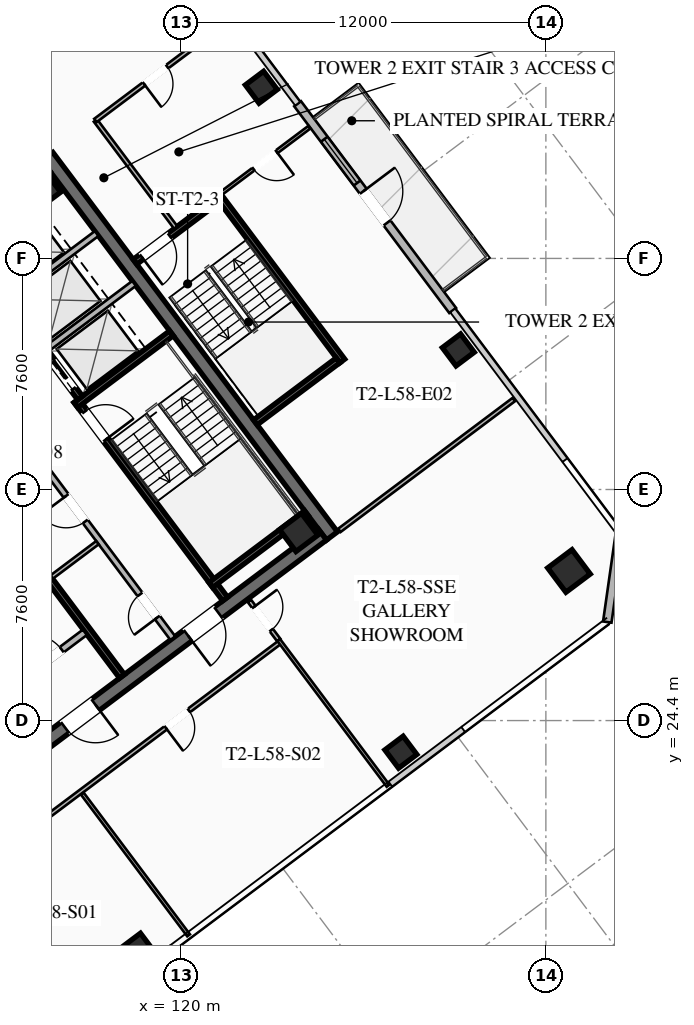
"""IFC4 building model, lengths in metres.
Left out: names, types, materials, properties, quantities, classifications, styles, units other than length and angle.
Written with IfcOpenShell. Run it as: python <this file> out.ifc"""

import sys

from ifc_helpers import new_model, si_unit, direction, frame, frame_2d, origin, origin_2d, place, context, subcontext, project, spatial, rectangle, hollow_rectangle, extrude, element, fill, save


model = new_model("IFC4")
c1 = context("Model", 3, precision=1e-05, world=origin(), true_north=direction((0.0, 1.0)))
c2 = subcontext(c1, "Body", "Model", "MODEL_VIEW")
j1 = project(units=[si_unit("LENGTHUNIT", "METRE"), si_unit("PLANEANGLEUNIT", "RADIAN")], contexts=[c1])
p1 = place(None, origin())
s1 = spatial("IfcSite", under=j1, at=p1, CompositionType="ELEMENT")
p2 = place(p1, origin())
s2 = spatial("IfcBuilding", under=s1, at=p2, CompositionType="ELEMENT")
p3 = place(p2, frame((0.0, 0.0, 214.85)))
s3 = spatial("IfcBuildingStorey", under=s2, at=p3, CompositionType="ELEMENT", Elevation=214.85)
p4 = place(p3, frame((115.604, 42.953, 0.0), z_axis=(0.0, 0.0, 1.0), x_axis=(0.600005007985, -0.799996243986, 0.0)))
e1 = element("IfcWall", 1, at=p4, inside=s3, PredefinedType="SHEAR", context=c2, shape_type="SweptSolid", body=[
    extrude(rectangle(XDim=15.6, YDim=0.45, at=frame_2d((7.8, 0.0))), origin(), (0.0, 0.0, 1.0), 3.55),
])
p5 = place(p3, frame((124.649, 30.518, 0.0), z_axis=(0.0, 0.0, 1.0), x_axis=(-0.8, -0.6, 0.0)))
e2 = element("IfcWall", 2, at=p5, inside=s3, PredefinedType="SHEAR", context=c2, shape_type="SweptSolid", body=[
    extrude(rectangle(XDim=15.26, YDim=0.45, at=frame_2d((7.63, 0.0))), origin(), (0.0, 0.0, 1.0), 3.55),
])
p6 = place(p5, frame((9.33, 0.0, 0.0)))
e3 = element("IfcOpeningElement", 3, at=p6, cuts=e2, PredefinedType="OPENING", context=c2, shape_type="SweptSolid", body=[
    extrude(rectangle(XDim=1.25, YDim=2.25, at=frame_2d((0.625, 1.125))), frame((0.0, 0.235, 0.0), z_axis=(0.0, -1.0, 0.0), x_axis=(1.0, 0.0, 0.0)), (0.0, 0.0, 1.0), 0.47),
])
p7 = place(p5, frame((4.28, 0.0, 0.0)))
e4 = element("IfcOpeningElement", 4, at=p7, cuts=e2, PredefinedType="OPENING", context=c2, shape_type="SweptSolid", body=[
    extrude(rectangle(XDim=1.25, YDim=2.25, at=frame_2d((0.625, 1.125))), frame((0.0, 0.235, 0.0), z_axis=(0.0, -1.0, 0.0), x_axis=(1.0, 0.0, 0.0)), (0.0, 0.0, 1.0), 0.47),
])
for number, where, z_axis, x_axis in (
    (5, (123.87, 30.59, 0.0), (0.0, 0.0, 1.0), (0.8, 0.6, 0.0)),
    (6, (115.41, 41.87, 0.0), (0.0, 0.0, 1.0), (0.8, 0.6, 0.0)),
):
    element("IfcColumn", number, at=place(p3, frame(where, z_axis=z_axis, x_axis=x_axis)), inside=s3, PredefinedType="COLUMN", context=c2, shape_type="SweptSolid", body=[
        extrude(hollow_rectangle(XDim=0.9, YDim=0.9, WallThickness=0.04, at=origin_2d()), origin(), (0.0, 0.0, 1.0), 3.37),
    ])
p8 = place(p3, frame((132.76, 29.32, 0.0), z_axis=(0.0, 0.0, 1.0), x_axis=(0.799999996291, 0.600000004945, 0.0)))
e7 = element("IfcColumn", 7, at=p8, inside=s3, PredefinedType="COLUMN", context=c2, shape_type="SweptSolid", body=[
    extrude(hollow_rectangle(XDim=1.0, YDim=1.0, WallThickness=0.04, at=origin_2d()), origin(), (0.0, 0.0, 1.0), 3.37),
])
for number, where, z_axis, x_axis in (
    (8, (118.59, 16.88, 0.0), (0.0, 0.0, 1.0), (0.8, 0.6, 0.0)),
    (9, (127.23, 23.36, 0.0), (0.0, 0.0, 1.0), (0.8, 0.6, 0.0)),
    (10, (129.12, 36.59, 0.0), (0.0, 0.0, 1.0), (0.8, 0.6, 0.0)),
    (11, (122.64, 45.23, 0.0), (0.0, 0.0, 1.0), (0.8, 0.6, 0.0)),
):
    element("IfcColumn", number, at=place(p3, frame(where, z_axis=z_axis, x_axis=x_axis)), inside=s3, PredefinedType="COLUMN", context=c2, shape_type="SweptSolid", body=[
        extrude(hollow_rectangle(XDim=0.75, YDim=0.75, WallThickness=0.032, at=origin_2d()), origin(), (0.0, 0.0, 1.0), 3.37),
    ])
p9 = place(p3, frame((123.834, 44.688, 0.0), z_axis=(0.0, 0.0, 1.0), x_axis=(0.600004595526, -0.799996553335, 0.0)))
e12 = element("IfcWall", 12, at=p9, inside=s3, PredefinedType="SOLIDWALL", context=c2, shape_type="SweptSolid", body=[
    extrude(rectangle(XDim=8.5, YDim=0.28, at=frame_2d((4.25, 0.0))), origin(), (0.0, 0.0, 1.0), 3.37),
])
p10 = place(p9, frame((3.6, 0.0, 0.0)))
e13 = element("IfcOpeningElement", 13, at=p10, cuts=e12, PredefinedType="OPENING", context=c2, shape_type="SweptSolid", body=[
    extrude(rectangle(XDim=1.3, YDim=2.15, at=frame_2d((0.65, 1.075))), frame((0.0, 0.15, 0.0), z_axis=(0.0, -1.0, 0.0), x_axis=(1.0, 0.0, 0.0)), (0.0, 0.0, 1.0), 0.3),
])
p11 = place(p9, frame((1.46, 0.0, 0.85)))
e14 = element("IfcOpeningElement", 14, at=p11, cuts=e12, PredefinedType="OPENING", context=c2, shape_type="SweptSolid", body=[
    extrude(rectangle(XDim=1.8, YDim=1.92, at=frame_2d((0.9, 0.96))), frame((0.0, 0.15, 0.0), z_axis=(0.0, -1.0, 0.0), x_axis=(1.0, 0.0, 0.0)), (0.0, 0.0, 1.0), 0.3),
])
p12 = place(p3, frame((134.44, 30.58, 0.0), z_axis=(0.0, 0.0, 1.0), x_axis=(-0.14138683146, -0.989954425158, 0.0)))
e15 = element("IfcWall", 15, at=p12, inside=s3, PredefinedType="SOLIDWALL", context=c2, shape_type="SweptSolid", body=[
    extrude(rectangle(XDim=2.97, YDim=0.28, at=frame_2d((1.485, 0.0))), origin(), (0.0, 0.0, 1.0), 3.37),
])
p13 = place(p3, frame((116.56, 34.92, 0.0), z_axis=(0.0, 0.0, 1.0), x_axis=(0.59999041401, -0.800007189403, 0.0)))
e16 = element("IfcWall", 16, at=p13, inside=s3, PredefinedType="SHEAR", context=c2, shape_type="SweptSolid", body=[
    extrude(rectangle(XDim=8.15, YDim=0.2, at=frame_2d((4.075, 0.0))), origin(), (0.0, 0.0, 1.0), 3.37),
])
p14 = place(p13, frame((0.45, 0.0, 0.0)))
e17 = element("IfcOpeningElement", 17, at=p14, cuts=e16, PredefinedType="OPENING", context=c2, shape_type="SweptSolid", body=[
    extrude(rectangle(XDim=1.15, YDim=2.2, at=frame_2d((0.575, 1.1))), frame((0.0, 0.11, 0.0), z_axis=(0.0, -1.0, 0.0), x_axis=(1.0, 0.0, 0.0)), (0.0, 0.0, 1.0), 0.22),
])
for number, where, z_axis, x_axis in (
    (18, (116.54, 34.78, 0.0), (0.0, 0.0, 1.0), (0.8, 0.6, 0.0)),
    (19, (120.98, 28.86, 0.0), (0.0, 0.0, 1.0), (0.8, 0.6, 0.0)),
):
    element("IfcWall", number, at=place(p3, frame(where, z_axis=z_axis, x_axis=x_axis)), inside=s3, PredefinedType="SHEAR", context=c2, shape_type="SweptSolid", body=[
        extrude(rectangle(XDim=3.93, YDim=0.2, at=frame_2d((1.965, 0.0))), origin(), (0.0, 0.0, 1.0), 3.37),
    ])
p15 = place(p3, frame((118.058, 25.856, 0.0), z_axis=(0.0, 0.0, 1.0), x_axis=(-0.600002657301, 0.799998007018, 0.0)))
e20 = element("IfcWall", 20, at=p15, inside=s3, PredefinedType="SHEAR", context=c2, shape_type="SweptSolid", body=[
    extrude(rectangle(XDim=14.7, YDim=0.2, at=frame_2d((7.35, 0.0))), origin(), (0.0, 0.0, 1.0), 3.37),
])
p16 = place(p3, frame((114.316, 25.412, 0.0), z_axis=(0.0, 0.0, 1.0), x_axis=(0.800018601094, 0.59997519774, 0.0)))
e21 = element("IfcWall", 21, at=p16, inside=s3, PredefinedType="SOLIDWALL", context=c2, shape_type="SweptSolid", body=[
    extrude(rectangle(XDim=3.15, YDim=0.22, at=frame_2d((1.575, 0.0))), origin(), (0.0, 0.0, 1.0), 2.723),
])
p17 = place(p16, frame((0.95, 0.0, 0.0)))
e22 = element("IfcOpeningElement", 22, at=p17, cuts=e21, PredefinedType="OPENING", context=c2, shape_type="SweptSolid", body=[
    extrude(rectangle(XDim=1.25, YDim=2.25, at=frame_2d((0.625, 1.125))), frame((0.0, 0.12, 0.0), z_axis=(0.0, -1.0, 0.0), x_axis=(1.0, 0.0, 0.0)), (0.0, 0.0, 1.0), 0.24),
])
p18 = place(p3, frame((112.75, 40.25, 0.0), z_axis=(0.0, 0.0, 1.0), x_axis=(0.599994036198, -0.800004472816, 0.0)))
e23 = element("IfcWall", 23, at=p18, inside=s3, PredefinedType="SHEAR", context=c2, shape_type="SweptSolid", body=[
    extrude(rectangle(XDim=6.55, YDim=0.2, at=frame_2d((3.275, 0.0))), origin(), (0.0, 0.0, 1.0), 3.37),
])
p19 = place(p18, frame((5.075, 0.0, 0.0)))
e24 = element("IfcOpeningElement", 24, at=p19, cuts=e23, PredefinedType="OPENING", context=c2, shape_type="SweptSolid", body=[
    extrude(rectangle(XDim=1.1, YDim=2.2, at=frame_2d((0.55, 1.1))), frame((0.0, 0.11, 0.0), z_axis=(0.0, -1.0, 0.0), x_axis=(1.0, 0.0, 0.0)), (0.0, 0.0, 1.0), 0.22),
])
p20 = place(p18, frame((3.025, 0.0, 0.0)))
e25 = element("IfcOpeningElement", 25, at=p20, cuts=e23, PredefinedType="OPENING", context=c2, shape_type="SweptSolid", body=[
    extrude(rectangle(XDim=1.1, YDim=2.2, at=frame_2d((0.55, 1.1))), frame((0.0, 0.11, 0.0), z_axis=(0.0, -1.0, 0.0), x_axis=(1.0, 0.0, 0.0)), (0.0, 0.0, 1.0), 0.22),
])
p21 = place(p18, frame((1.025, 0.0, 0.0)))
e26 = element("IfcOpeningElement", 26, at=p21, cuts=e23, PredefinedType="OPENING", context=c2, shape_type="SweptSolid", body=[
    extrude(rectangle(XDim=1.1, YDim=2.2, at=frame_2d((0.55, 1.1))), frame((0.0, 0.11, 0.0), z_axis=(0.0, -1.0, 0.0), x_axis=(1.0, 0.0, 0.0)), (0.0, 0.0, 1.0), 0.22),
])
for number, where, z_axis, x_axis in (
    (27, (115.59, 36.63, 0.0), (0.0, 0.0, 1.0), (0.8, 0.6, 0.0)),
    (28, (114.36, 38.27, 0.0), (0.0, 0.0, 1.0), (0.8, 0.6, 0.0)),
):
    element("IfcWall", number, at=place(p3, frame(where, z_axis=z_axis, x_axis=x_axis)), inside=s3, PredefinedType="SOLIDWALL", context=c2, shape_type="SweptSolid", body=[
        extrude(rectangle(XDim=3.58, YDim=0.2, at=frame_2d((1.79, 0.0))), origin(), (0.0, 0.0, 1.0), 3.37),
    ])
p22 = place(p3, frame((119.73, 27.11, 0.0), z_axis=(0.0, 0.0, 1.0), x_axis=(-0.600005580459, 0.799995814625, 0.0)))
e29 = element("IfcWall", 29, at=p22, inside=s3, PredefinedType="SOLIDWALL", context=c2, shape_type="SweptSolid", body=[
    extrude(rectangle(XDim=7.0, YDim=0.2, at=frame_2d((3.5, 0.0))), origin(), (0.0, 0.0, 1.0), 2.723),
])
p23 = place(p22, frame((0.85, 0.0, 0.0)))
e30 = element("IfcOpeningElement", 30, at=p23, cuts=e29, PredefinedType="OPENING", context=c2, shape_type="SweptSolid", body=[
    extrude(rectangle(XDim=0.95, YDim=2.05, at=frame_2d((0.475, 1.025))), frame((0.0, 0.11, 0.0), z_axis=(0.0, -1.0, 0.0), x_axis=(1.0, 0.0, 0.0)), (0.0, 0.0, 1.0), 0.22),
])
p24 = place(p22, frame((4.8, 0.0, 0.0)))
e31 = element("IfcOpeningElement", 31, at=p24, cuts=e29, PredefinedType="OPENING", context=c2, shape_type="SweptSolid", body=[
    extrude(rectangle(XDim=1.05, YDim=2.2, at=frame_2d((0.525, 1.1))), frame((0.0, 0.11, 0.0), z_axis=(0.0, -1.0, 0.0), x_axis=(1.0, 0.0, 0.0)), (0.0, 0.0, 1.0), 0.22),
])
p25 = place(p3, frame((115.746, 29.122, 0.0), z_axis=(0.0, 0.0, 1.0), x_axis=(0.8, 0.6, 0.0)))
e32 = element("IfcWall", 32, at=p25, inside=s3, PredefinedType="PARTITIONING", context=c2, shape_type="SweptSolid", body=[
    extrude(rectangle(XDim=1.88, YDim=0.135, at=frame_2d((0.94, 0.0))), origin(), (0.0, 0.0, 1.0), 2.723),
])
p26 = place(p3, frame((125.304, 36.228, 0.0), z_axis=(0.0, 0.0, 1.0), x_axis=(-0.59998851072, 0.800008616831, 0.0)))
e33 = element("IfcWall", 33, at=p26, inside=s3, PredefinedType="SHEAR", context=c2, shape_type="SweptSolid", body=[
    extrude(rectangle(XDim=6.8, YDim=0.2, at=frame_2d((3.4, 0.0))), origin(), (0.0, 0.0, 1.0), 3.37),
])
p27 = place(p3, frame((121.204, 41.528, 0.0), z_axis=(0.0, 0.0, 1.0), x_axis=(-0.800017232136, -0.599977023131, 0.0)))
e34 = element("IfcWall", 34, at=p27, inside=s3, PredefinedType="SHEAR", context=c2, shape_type="SweptSolid", body=[
    extrude(rectangle(XDim=3.4, YDim=0.2, at=frame_2d((1.7, 0.0))), origin(), (0.0, 0.0, 1.0), 3.37),
])
p28 = place(p27, frame((1.975, 0.0, 0.0)))
e35 = element("IfcOpeningElement", 35, at=p28, cuts=e34, PredefinedType="OPENING", context=c2, shape_type="SweptSolid", body=[
    extrude(rectangle(XDim=1.15, YDim=2.2, at=frame_2d((0.575, 1.1))), frame((0.0, 0.11, 0.0), z_axis=(0.0, -1.0, 0.0), x_axis=(1.0, 0.0, 0.0)), (0.0, 0.0, 1.0), 0.22),
])
p29 = place(p3, frame((122.444, 34.208, 0.0), z_axis=(0.0, 0.0, 1.0), x_axis=(0.79999138319, 0.600011488909, 0.0)))
e36 = element("IfcWall", 36, at=p29, inside=s3, PredefinedType="SHEAR", context=c2, shape_type="SweptSolid", body=[
    extrude(rectangle(XDim=3.4, YDim=0.2, at=frame_2d((1.7, 0.0))), origin(), (0.0, 0.0, 1.0), 3.37),
])
p30 = place(p3, frame((119.824, 40.618, 0.0), z_axis=(0.0, 0.0, 1.0), x_axis=(-0.599982243973, 0.800013316712, 0.0)))
e37 = element("IfcWall", 37, at=p30, inside=s3, PredefinedType="PARTITIONING", context=c2, shape_type="SweptSolid", body=[
    extrude(rectangle(XDim=4.4, YDim=0.135, at=frame_2d((2.2, 0.0))), origin(), (0.0, 0.0, 1.0), 2.723),
])
p31 = place(p3, frame((98.666, 34.062, 0.0), z_axis=(0.0, 0.0, 1.0), x_axis=(0.800003619866, 0.599995173482, 0.0)))
e38 = element("IfcWall", 38, at=p31, inside=s3, PredefinedType="PARTITIONING", context=c2, shape_type="SweptSolid", body=[
    extrude(rectangle(XDim=24.28, YDim=0.135, at=frame_2d((12.14, 0.0))), origin(), (0.0, 0.0, 1.0), 2.723),
])
p32 = place(p31, frame((0.3, 0.0, 0.0)))
e39 = element("IfcOpeningElement", 39, at=p32, cuts=e38, PredefinedType="OPENING", context=c2, shape_type="SweptSolid", body=[
    extrude(rectangle(XDim=0.95, YDim=2.05, at=frame_2d((0.475, 1.025))), frame((0.0, 0.077, 0.0), z_axis=(0.0, -1.0, 0.0), x_axis=(1.0, 0.0, 0.0)), (0.0, 0.0, 1.0), 0.155),
])
p33 = place(p31, frame((10.854, 0.0, 0.0)))
e40 = element("IfcOpeningElement", 40, at=p33, cuts=e38, PredefinedType="OPENING", context=c2, shape_type="SweptSolid", body=[
    extrude(rectangle(XDim=0.95, YDim=2.05, at=frame_2d((0.475, 1.025))), frame((0.0, 0.077, 0.0), z_axis=(0.0, -1.0, 0.0), x_axis=(1.0, 0.0, 0.0)), (0.0, 0.0, 1.0), 0.155),
])
p34 = place(p31, frame((23.03, 0.0, 0.0)))
e41 = element("IfcOpeningElement", 41, at=p34, cuts=e38, PredefinedType="OPENING", context=c2, shape_type="SweptSolid", body=[
    extrude(rectangle(XDim=0.95, YDim=2.05, at=frame_2d((0.475, 1.025))), frame((0.0, 0.077, 0.0), z_axis=(0.0, -1.0, 0.0), x_axis=(1.0, 0.0, 0.0)), (0.0, 0.0, 1.0), 0.155),
])
p35 = place(p3, frame((123.262, 26.984, 0.0), z_axis=(0.0, 0.0, 1.0), x_axis=(-0.800005696094, -0.599992405132, 0.0)))
e42 = element("IfcWall", 42, at=p35, inside=s3, PredefinedType="PARTITIONING", context=c2, shape_type="SweptSolid", body=[
    extrude(rectangle(XDim=15.43, YDim=0.135, at=frame_2d((7.715, 0.0))), origin(), (0.0, 0.0, 1.0), 2.723),
])
p36 = place(p35, frame((14.1, 0.0, 0.0)))
e43 = element("IfcOpeningElement", 43, at=p36, cuts=e42, PredefinedType="OPENING", context=c2, shape_type="SweptSolid", body=[
    extrude(rectangle(XDim=0.95, YDim=2.05, at=frame_2d((0.475, 1.025))), frame((0.0, 0.077, 0.0), z_axis=(0.0, -1.0, 0.0), x_axis=(1.0, 0.0, 0.0)), (0.0, 0.0, 1.0), 0.155),
])
p37 = place(p35, frame((3.755, 0.0, 0.0)))
e44 = element("IfcOpeningElement", 44, at=p37, cuts=e42, PredefinedType="OPENING", context=c2, shape_type="SweptSolid", body=[
    extrude(rectangle(XDim=0.95, YDim=2.05, at=frame_2d((0.475, 1.025))), frame((0.0, 0.077, 0.0), z_axis=(0.0, -1.0, 0.0), x_axis=(1.0, 0.0, 0.0)), (0.0, 0.0, 1.0), 0.155),
])
p38 = place(p3, frame((122.248, 28.336, 0.0), z_axis=(0.0, 0.0, 1.0), x_axis=(0.600072788757, -0.799945403258, 0.0)))
e45 = element("IfcWall", 45, at=p38, inside=s3, PredefinedType="PARTITIONING", context=c2, shape_type="SweptSolid", body=[
    extrude(rectangle(XDim=1.61, YDim=0.135, at=frame_2d((0.805, 0.0))), origin(), (0.0, 0.0, 1.0), 2.723),
])
p39 = place(p38, frame((0.25, 0.0, 0.0)))
e46 = element("IfcOpeningElement", 46, at=p39, cuts=e45, PredefinedType="OPENING", context=c2, shape_type="SweptSolid", body=[
    extrude(rectangle(XDim=0.95, YDim=2.05, at=frame_2d((0.475, 1.025))), frame((0.0, 0.077, 0.0), z_axis=(0.0, -1.0, 0.0), x_axis=(1.0, 0.0, 0.0)), (0.0, 0.0, 1.0), 0.155),
])
p40 = place(p3, frame((120.248, 17.336, 0.0), z_axis=(0.0, 0.0, 1.0), x_axis=(-0.6, 0.8, 0.0)))
e47 = element("IfcWall", 47, at=p40, inside=s3, PredefinedType="PARTITIONING", context=c2, shape_type="SweptSolid", body=[
    extrude(rectangle(XDim=5.83, YDim=0.11, at=frame_2d((2.915, 0.0))), origin(), (0.0, 0.0, 1.0), 2.723),
])
p41 = place(p3, frame((126.808, 22.256, 0.0), z_axis=(0.0, 0.0, 1.0), x_axis=(-0.6, 0.8, 0.0)))
e48 = element("IfcWall", 48, at=p41, inside=s3, PredefinedType="PARTITIONING", context=c2, shape_type="SweptSolid", body=[
    extrude(rectangle(XDim=5.99, YDim=0.11, at=frame_2d((2.995, 0.0))), origin(), (0.0, 0.0, 1.0), 2.723),
])
p42 = place(p3, frame((121.584, 47.438, 0.0), z_axis=(0.0, 0.0, 1.0), x_axis=(-0.79998934637, -0.600014204577, 0.0)))
e49 = element("IfcWall", 49, at=p42, inside=s3, PredefinedType="PARTITIONING", context=c2, shape_type="SweptSolid", body=[
    extrude(rectangle(XDim=5.5, YDim=0.135, at=frame_2d((2.75, 0.0))), origin(), (0.0, 0.0, 1.0), 2.723),
])
p43 = place(p42, frame((2.55, 0.0, 0.0)))
e50 = element("IfcOpeningElement", 50, at=p43, cuts=e49, PredefinedType="OPENING", context=c2, shape_type="SweptSolid", body=[
    extrude(rectangle(XDim=0.95, YDim=2.05, at=frame_2d((0.475, 1.025))), frame((0.0, 0.077, 0.0), z_axis=(0.0, -1.0, 0.0), x_axis=(1.0, 0.0, 0.0)), (0.0, 0.0, 1.0), 0.155),
])
p44 = place(p3, frame((125.208, 30.656, 0.0), z_axis=(0.0, 0.0, 1.0), x_axis=(0.800004085978, 0.599994551991, 0.0)))
e51 = element("IfcWall", 51, at=p44, inside=s3, PredefinedType="PARTITIONING", context=c2, shape_type="SweptSolid", body=[
    extrude(rectangle(XDim=7.17, YDim=0.135, at=frame_2d((3.585, 0.0))), origin(), (0.0, 0.0, 1.0), 2.723),
])
p45 = place(p3, frame((124.224, 43.918, 0.0), z_axis=(0.0, 0.0, 1.0), x_axis=(-0.800024078335, -0.599967894211, 0.0)))
e52 = element("IfcWall", 52, at=p45, inside=s3, PredefinedType="PARTITIONING", context=c2, shape_type="SweptSolid", body=[
    extrude(rectangle(XDim=3.65, YDim=0.11, at=frame_2d((1.825, 0.0))), origin(), (0.0, 0.0, 1.0), 2.723),
])
p46 = place(p45, frame((1.35, 0.0, 0.0)))
e53 = element("IfcOpeningElement", 53, at=p46, cuts=e52, PredefinedType="OPENING", context=c2, shape_type="SweptSolid", body=[
    extrude(rectangle(XDim=0.95, YDim=2.05, at=frame_2d((0.475, 1.025))), frame((0.0, 0.065, 0.0), z_axis=(0.0, -1.0, 0.0), x_axis=(1.0, 0.0, 0.0)), (0.0, 0.0, 1.0), 0.13),
])
p47 = place(p10, origin())
e54 = element("IfcDoor", 54, at=p47, inside=s3, OperationType="SINGLE_SWING_LEFT", PredefinedType="DOOR", context=c2, shape_type="SweptSolid", body=[
    extrude(rectangle(XDim=1.3, YDim=2.15, at=frame_2d((0.65, 1.075))), frame((0.0, 0.025, 0.0), z_axis=(0.0, -1.0, 0.0), x_axis=(1.0, 0.0, 0.0)), (0.0, 0.0, 1.0), 0.05),
])
fill(e13, e54)
p48 = place(p11, origin())
e55 = element("IfcWindow", 55, at=p48, inside=s3, PartitioningType="SINGLE_PANEL", PredefinedType="WINDOW", context=c2, shape_type="SweptSolid", body=[
    extrude(rectangle(XDim=1.8, YDim=1.92, at=frame_2d((0.9, 0.96))), frame((0.0, 0.03, 0.0), z_axis=(0.0, -1.0, 0.0), x_axis=(1.0, 0.0, 0.0)), (0.0, 0.0, 1.0), 0.06),
])
fill(e14, e55)
p49 = place(p6, origin())
e56 = element("IfcDoor", 56, at=p49, inside=s3, OperationType="SINGLE_SWING_LEFT", PredefinedType="DOOR", context=c2, shape_type="SweptSolid", body=[
    extrude(rectangle(XDim=1.25, YDim=2.25, at=frame_2d((0.625, 1.125))), frame((0.0, 0.025, 0.0), z_axis=(0.0, -1.0, 0.0), x_axis=(1.0, 0.0, 0.0)), (0.0, 0.0, 1.0), 0.05),
])
fill(e3, e56)
p50 = place(p7, origin())
e57 = element("IfcDoor", 57, at=p50, inside=s3, OperationType="SINGLE_SWING_RIGHT", PredefinedType="DOOR", context=c2, shape_type="SweptSolid", body=[
    extrude(rectangle(XDim=1.25, YDim=2.25, at=frame_2d((0.625, 1.125))), frame((0.0, 0.025, 0.0), z_axis=(0.0, -1.0, 0.0), x_axis=(1.0, 0.0, 0.0)), (0.0, 0.0, 1.0), 0.05),
])
fill(e4, e57)
p51 = place(p14, origin())
e58 = element("IfcDoor", 58, at=p51, inside=s3, OperationType="SINGLE_SWING_RIGHT", PredefinedType="DOOR", context=c2, shape_type="SweptSolid", body=[
    extrude(rectangle(XDim=1.15, YDim=2.2, at=frame_2d((0.575, 1.1))), frame((0.0, 0.025, 0.0), z_axis=(0.0, -1.0, 0.0), x_axis=(1.0, 0.0, 0.0)), (0.0, 0.0, 1.0), 0.05),
])
fill(e17, e58)
p52 = place(p17, origin())
e59 = element("IfcDoor", 59, at=p52, inside=s3, OperationType="SINGLE_SWING_LEFT", PredefinedType="DOOR", context=c2, shape_type="SweptSolid", body=[
    extrude(rectangle(XDim=1.25, YDim=2.25, at=frame_2d((0.625, 1.125))), frame((0.0, 0.025, 0.0), z_axis=(0.0, -1.0, 0.0), x_axis=(1.0, 0.0, 0.0)), (0.0, 0.0, 1.0), 0.05),
])
fill(e22, e59)
p53 = place(p23, origin())
e60 = element("IfcDoor", 60, at=p53, inside=s3, OperationType="SINGLE_SWING_LEFT", PredefinedType="DOOR", context=c2, shape_type="SweptSolid", body=[
    extrude(rectangle(XDim=0.95, YDim=2.05, at=frame_2d((0.475, 1.025))), frame((0.0, 0.025, 0.0), z_axis=(0.0, -1.0, 0.0), x_axis=(1.0, 0.0, 0.0)), (0.0, 0.0, 1.0), 0.05),
])
fill(e30, e60)
p54 = place(p24, origin())
e61 = element("IfcDoor", 61, at=p54, inside=s3, OperationType="SINGLE_SWING_RIGHT", PredefinedType="DOOR", context=c2, shape_type="SweptSolid", body=[
    extrude(rectangle(XDim=1.05, YDim=2.2, at=frame_2d((0.525, 1.1))), frame((0.0, 0.025, 0.0), z_axis=(0.0, -1.0, 0.0), x_axis=(1.0, 0.0, 0.0)), (0.0, 0.0, 1.0), 0.05),
])
fill(e31, e61)
p55 = place(p28, origin())
e62 = element("IfcDoor", 62, at=p55, inside=s3, OperationType="SINGLE_SWING_RIGHT", PredefinedType="DOOR", context=c2, shape_type="SweptSolid", body=[
    extrude(rectangle(XDim=1.15, YDim=2.2, at=frame_2d((0.575, 1.1))), frame((0.0, 0.025, 0.0), z_axis=(0.0, -1.0, 0.0), x_axis=(1.0, 0.0, 0.0)), (0.0, 0.0, 1.0), 0.05),
])
fill(e35, e62)
p56 = place(p37, origin())
e63 = element("IfcDoor", 63, at=p56, inside=s3, OperationType="SINGLE_SWING_RIGHT", PredefinedType="DOOR", context=c2, shape_type="SweptSolid", body=[
    extrude(rectangle(XDim=0.95, YDim=2.05, at=frame_2d((0.475, 1.025))), frame((0.0, 0.025, 0.0), z_axis=(0.0, -1.0, 0.0), x_axis=(1.0, 0.0, 0.0)), (0.0, 0.0, 1.0), 0.05),
])
fill(e44, e63)
p57 = place(p39, origin())
e64 = element("IfcDoor", 64, at=p57, inside=s3, OperationType="SINGLE_SWING_LEFT", PredefinedType="DOOR", context=c2, shape_type="SweptSolid", body=[
    extrude(rectangle(XDim=0.95, YDim=2.05, at=frame_2d((0.475, 1.025))), frame((0.0, 0.025, 0.0), z_axis=(0.0, -1.0, 0.0), x_axis=(1.0, 0.0, 0.0)), (0.0, 0.0, 1.0), 0.05),
])
fill(e46, e64)
p58 = place(p43, origin())
e65 = element("IfcDoor", 65, at=p58, inside=s3, OperationType="SINGLE_SWING_RIGHT", PredefinedType="DOOR", context=c2, shape_type="SweptSolid", body=[
    extrude(rectangle(XDim=0.95, YDim=2.05, at=frame_2d((0.475, 1.025))), frame((0.0, 0.025, 0.0), z_axis=(0.0, -1.0, 0.0), x_axis=(1.0, 0.0, 0.0)), (0.0, 0.0, 1.0), 0.05),
])
fill(e50, e65)
p59 = place(p46, origin())
e66 = element("IfcDoor", 66, at=p59, inside=s3, OperationType="SINGLE_SWING_LEFT", PredefinedType="DOOR", context=c2, shape_type="SweptSolid", body=[
    extrude(rectangle(XDim=0.95, YDim=2.05, at=frame_2d((0.475, 1.025))), frame((0.0, 0.025, 0.0), z_axis=(0.0, -1.0, 0.0), x_axis=(1.0, 0.0, 0.0)), (0.0, 0.0, 1.0), 0.05),
])
fill(e53, e66)
p60 = place(p19, origin())
e67 = element("IfcDoor", 67, at=p60, inside=s3, OperationType="SLIDING_TO_LEFT", PredefinedType="DOOR", context=c2, shape_type="SweptSolid", body=[
    extrude(rectangle(XDim=1.1, YDim=2.2, at=frame_2d((0.55, 1.1))), frame((0.0, 0.025, 0.0), z_axis=(0.0, -1.0, 0.0), x_axis=(1.0, 0.0, 0.0)), (0.0, 0.0, 1.0), 0.05),
])
fill(e24, e67)
save(model, sys.argv[1])
